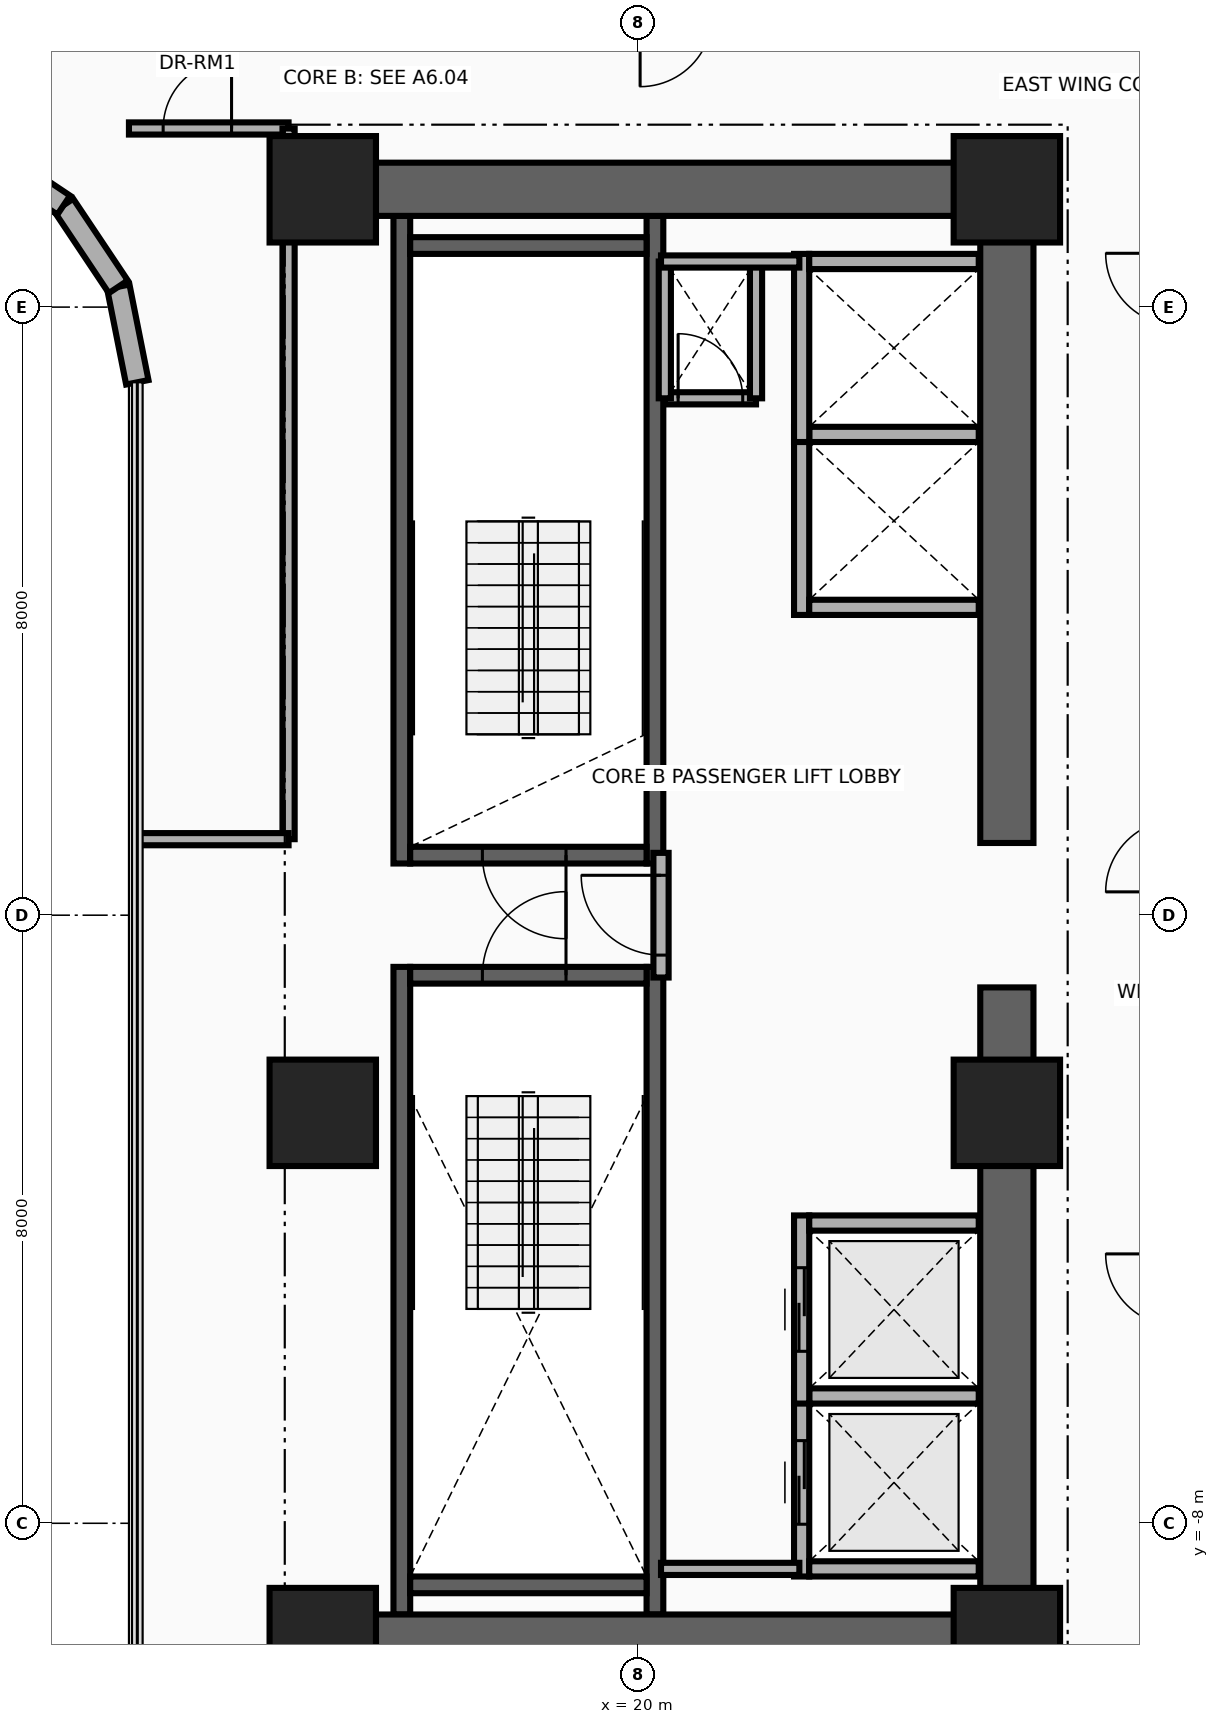
"""IFC4 building model, lengths in metres.
Left out: names, types, materials, properties, quantities, classifications, styles, units other than length and angle.
Written with IfcOpenShell. Run it as: python <this file> out.ifc"""

import sys

from ifc_helpers import new_model, si_unit, direction, frame, frame_2d, origin, origin_2d, place, context, subcontext, project, spatial, rectangle, extrude, source, transform, mapped, element, fill, save


model = new_model("IFC4")
c1 = context("Model", 3, precision=1e-05, world=origin(), true_north=direction((0.0, 1.0)))
c2 = subcontext(c1, "Body", "Model", "MODEL_VIEW")
j1 = project(units=[si_unit("LENGTHUNIT", "METRE"), si_unit("PLANEANGLEUNIT", "RADIAN")], contexts=[c1])
p1 = place(None, origin())
s1 = spatial("IfcSite", under=j1, at=p1, CompositionType="ELEMENT")
p2 = place(p1, origin())
s2 = spatial("IfcBuilding", under=s1, at=p2, CompositionType="ELEMENT")
p3 = place(p2, frame((0.0, 0.0, 29.7)))
s3 = spatial("IfcBuildingStorey", under=s2, at=p3, CompositionType="ELEMENT", Elevation=29.7)
for number, where, z_axis, x_axis in (
    (1, (16.89, 0.68, 0.0), (0.0, 0.0, 1.0), (0.0, 1.0, 0.0)),
    (2, (20.22, 0.68, 0.0), (0.0, 0.0, 1.0), (0.0, 1.0, 0.0)),
):
    element("IfcWall", number, at=place(p3, frame(where, z_axis=z_axis, x_axis=x_axis)), inside=s3, PredefinedType="SHEAR", context=c2, shape_type="SweptSolid", body=[
        extrude(rectangle(XDim=8.52, YDim=0.22, at=frame_2d((4.26, 0.0))), origin(), (0.0, 0.0, 1.0), 3.46),
    ])
p4 = place(p3, frame((17.0, 0.79, 0.0), z_axis=(0.0, 0.0, 1.0), x_axis=(1.0, 0.0, 0.0)))
e3 = element("IfcWall", 3, at=p4, inside=s3, PredefinedType="SHEAR", context=c2, shape_type="SweptSolid", body=[
    extrude(rectangle(XDim=3.11, YDim=0.22, at=frame_2d((1.555, 0.0))), origin(), (0.0, 0.0, 1.0), 3.46),
])
p5 = place(p4, frame((0.95, 0.0, 0.0)))
e4 = element("IfcOpeningElement", 4, at=p5, cuts=e3, PredefinedType="OPENING", context=c2, shape_type="SweptSolid", body=[
    extrude(rectangle(XDim=1.1, YDim=2.15, at=frame_2d((0.55, 1.075))), frame((0.0, 0.125, 0.0), z_axis=(0.0, -1.0, 0.0), x_axis=(1.0, 0.0, 0.0)), (0.0, 0.0, 1.0), 0.25),
])
p6 = place(p3, frame((17.0, 8.81, 0.0), z_axis=(0.0, 0.0, 1.0), x_axis=(1.0, 0.0, 0.0)))
e5 = element("IfcWall", 5, at=p6, inside=s3, PredefinedType="SHEAR", context=c2, shape_type="SweptSolid", body=[
    extrude(rectangle(XDim=3.11, YDim=0.22, at=frame_2d((1.555, 0.0))), origin(), (0.0, 0.0, 1.0), 3.46),
])
for number, where, z_axis, x_axis in (
    (6, (16.89, -9.2, 0.0), (0.0, 0.0, 1.0), (0.0, 1.0, 0.0)),
    (7, (20.22, -9.2, 0.0), (0.0, 0.0, 1.0), (0.0, 1.0, 0.0)),
):
    element("IfcWall", number, at=place(p3, frame(where, z_axis=z_axis, x_axis=x_axis)), inside=s3, PredefinedType="SHEAR", context=c2, shape_type="SweptSolid", body=[
        extrude(rectangle(XDim=8.52, YDim=0.22, at=frame_2d((4.26, 0.0))), origin(), (0.0, 0.0, 1.0), 3.46),
    ])
p7 = place(p3, frame((17.0, -8.81, 0.0), z_axis=(0.0, 0.0, 1.0), x_axis=(1.0, 0.0, 0.0)))
e8 = element("IfcWall", 8, at=p7, inside=s3, PredefinedType="SHEAR", context=c2, shape_type="SweptSolid", body=[
    extrude(rectangle(XDim=3.11, YDim=0.22, at=frame_2d((1.555, 0.0))), origin(), (0.0, 0.0, 1.0), 3.46),
])
p8 = place(p3, frame((17.0, -0.79, 0.0), z_axis=(0.0, 0.0, 1.0), x_axis=(1.0, 0.0, 0.0)))
e9 = element("IfcWall", 9, at=p8, inside=s3, PredefinedType="SHEAR", context=c2, shape_type="SweptSolid", body=[
    extrude(rectangle(XDim=3.11, YDim=0.22, at=frame_2d((1.555, 0.0))), origin(), (0.0, 0.0, 1.0), 3.46),
])
p9 = place(p8, frame((0.95, 0.0, 0.0)))
e10 = element("IfcOpeningElement", 10, at=p9, cuts=e9, PredefinedType="OPENING", context=c2, shape_type="SweptSolid", body=[
    extrude(rectangle(XDim=1.1, YDim=2.15, at=frame_2d((0.55, 1.075))), frame((0.0, 0.125, 0.0), z_axis=(0.0, -1.0, 0.0), x_axis=(1.0, 0.0, 0.0)), (0.0, 0.0, 1.0), 0.25),
])
for number, where, z_axis, x_axis in (
    (11, (24.85, -9.9, 0.0), (0.0, 0.0, 1.0), (0.0, 1.0, 0.0)),
    (12, (24.85, 0.95, 0.0), (0.0, 0.0, 1.0), (0.0, 1.0, 0.0)),
):
    element("IfcWall", number, at=place(p3, frame(where, z_axis=z_axis, x_axis=x_axis)), inside=s3, PredefinedType="SHEAR", context=c2, shape_type="SweptSolid", body=[
        extrude(rectangle(XDim=8.95, YDim=0.7, at=frame_2d((4.475, 0.0))), origin(), (0.0, 0.0, 1.0), 3.46),
    ])
for number, where, z_axis, x_axis in (
    (13, (15.85, 9.55, 0.0), (0.0, 0.0, 1.0), (1.0, 0.0, 0.0)),
    (14, (15.85, -9.55, 0.0), (0.0, 0.0, 1.0), (1.0, 0.0, 0.0)),
):
    element("IfcWall", number, at=place(p3, frame(where, z_axis=z_axis, x_axis=x_axis)), inside=s3, PredefinedType="SHEAR", context=c2, shape_type="SweptSolid", body=[
        extrude(rectangle(XDim=9.0, YDim=0.7, at=frame_2d((4.5, 0.0))), origin(), (0.0, 0.0, 1.0), 3.46),
    ])
m1 = source(origin(), c2, "Body", "SweptSolid", [
    extrude(rectangle(XDim=1.4, YDim=1.4, at=origin_2d()), origin(), (0.0, 0.0, 1.0), 3.7),
])
for number, where, z_axis, x_axis in (
    (15, (15.85, -9.55, 0.0), (0.0, 0.0, 1.0), (1.0, 0.0, 0.0)),
    (16, (24.85, -9.55, 0.0), (0.0, 0.0, 1.0), (1.0, 0.0, 0.0)),
    (17, (15.85, -2.6, 0.0), (0.0, 0.0, 1.0), (1.0, 0.0, 0.0)),
    (18, (24.85, -2.6, 0.0), (0.0, 0.0, 1.0), (1.0, 0.0, 0.0)),
    (19, (15.85, 9.55, 0.0), (0.0, 0.0, 1.0), (1.0, 0.0, 0.0)),
    (20, (24.85, 9.55, 0.0), (0.0, 0.0, 1.0), (1.0, 0.0, 0.0)),
):
    element("IfcColumn", number, at=place(p3, frame(where, z_axis=z_axis, x_axis=x_axis)), inside=s3, PredefinedType="COLUMN", context=c2, shape_type="MappedRepresentation", body=[
        mapped(m1, transform((0.0, 0.0, 0.0), x_axis=(1.0, 0.0, 0.0), y_axis=(0.0, 1.0, 0.0), z_axis=(0.0, 0.0, 1.0), scale=1.0)),
    ])
p10 = place(p3, frame((13.41, 7.011, 0.0), z_axis=(0.0, 0.0, 1.0), x_axis=(-0.195090163074, 0.980785312019, 0.0)))
e21 = element("IfcWall", 21, at=p10, inside=s3, PredefinedType="SOLIDWALL", context=c2, shape_type="SweptSolid", body=[
    extrude(rectangle(XDim=1.281, YDim=0.3, at=frame_2d((0.641, 0.0))), origin(), (0.0, 0.0, 1.0), 3.46),
])
for number, where, z_axis, x_axis in (
    (22, (13.16, 8.268, 0.0), (0.0, 0.0, 1.0), (-0.556, 0.831, 0.0)),
    (23, (12.442, 9.342, 0.0), (0.0, 0.0, 1.0), (-0.831, 0.556, 0.0)),
):
    element("IfcWall", number, at=place(p3, frame(where, z_axis=z_axis, x_axis=x_axis)), inside=s3, PredefinedType="SOLIDWALL", context=c2, shape_type="SweptSolid", body=[
        extrude(rectangle(XDim=1.292, YDim=0.3, at=frame_2d((0.646, 0.0))), origin(), (0.0, 0.0, 1.0), 3.46),
    ])
p11 = place(p3, frame((22.15, -8.7, 0.0), z_axis=(0.0, 0.0, 1.0), x_axis=(0.0, 1.0, 0.0)))
e24 = element("IfcWall", 24, at=p11, inside=s3, PredefinedType="MOVABLE", context=c2, shape_type="SweptSolid", body=[
    extrude(rectangle(XDim=2.475, YDim=0.2, at=frame_2d((1.237, 0.0))), origin(), (0.0, 0.0, 1.0), 3.46),
])
p12 = place(p11, frame((0.688, 0.0, 0.0)))
e25 = element("IfcOpeningElement", 25, at=p12, cuts=e24, PredefinedType="OPENING", context=c2, shape_type="SweptSolid", body=[
    extrude(rectangle(XDim=1.1, YDim=2.1, at=frame_2d((0.55, 1.05))), frame((0.0, 0.115, 0.0), z_axis=(0.0, -1.0, 0.0), x_axis=(1.0, 0.0, 0.0)), (0.0, 0.0, 1.0), 0.23),
])
for number, where, z_axis, x_axis in (
    (26, (22.25, -8.6, 0.0), (0.0, 0.0, 1.0), (1.0, 0.0, 0.0)),
    (27, (22.25, -6.325, 0.0), (0.0, 0.0, 1.0), (1.0, 0.0, 0.0)),
):
    element("IfcWall", number, at=place(p3, frame(where, z_axis=z_axis, x_axis=x_axis)), inside=s3, PredefinedType="MOVABLE", context=c2, shape_type="SweptSolid", body=[
        extrude(rectangle(XDim=2.23, YDim=0.2, at=frame_2d((1.115, 0.0))), origin(), (0.0, 0.0, 1.0), 3.46),
    ])
p13 = place(p3, frame((22.15, -6.425, 0.0), z_axis=(0.0, 0.0, 1.0), x_axis=(0.0, 1.0, 0.0)))
e28 = element("IfcWall", 28, at=p13, inside=s3, PredefinedType="MOVABLE", context=c2, shape_type="SweptSolid", body=[
    extrude(rectangle(XDim=2.475, YDim=0.2, at=frame_2d((1.238, 0.0))), origin(), (0.0, 0.0, 1.0), 3.46),
])
p14 = place(p13, frame((0.688, 0.0, 0.0)))
e29 = element("IfcOpeningElement", 29, at=p14, cuts=e28, PredefinedType="OPENING", context=c2, shape_type="SweptSolid", body=[
    extrude(rectangle(XDim=1.1, YDim=2.1, at=frame_2d((0.55, 1.05))), frame((0.0, 0.115, 0.0), z_axis=(0.0, -1.0, 0.0), x_axis=(1.0, 0.0, 0.0)), (0.0, 0.0, 1.0), 0.23),
])
p15 = place(p3, frame((22.25, -4.05, 0.0), z_axis=(0.0, 0.0, 1.0), x_axis=(1.0, 0.0, 0.0)))
e30 = element("IfcWall", 30, at=p15, inside=s3, PredefinedType="MOVABLE", context=c2, shape_type="SweptSolid", body=[
    extrude(rectangle(XDim=2.23, YDim=0.2, at=frame_2d((1.115, 0.0))), origin(), (0.0, 0.0, 1.0), 3.46),
])
p16 = place(p3, frame((22.15, 3.95, 0.0), z_axis=(0.0, 0.0, 1.0), x_axis=(0.0, 1.0, 0.0)))
e31 = element("IfcWall", 31, at=p16, inside=s3, PredefinedType="MOVABLE", context=c2, shape_type="SweptSolid", body=[
    extrude(rectangle(XDim=2.475, YDim=0.2, at=frame_2d((1.238, 0.0))), origin(), (0.0, 0.0, 1.0), 3.46),
])
for number, where, z_axis, x_axis in (
    (32, (22.25, 4.05, 0.0), (0.0, 0.0, 1.0), (1.0, 0.0, 0.0)),
    (33, (22.25, 6.325, 0.0), (0.0, 0.0, 1.0), (1.0, 0.0, 0.0)),
):
    element("IfcWall", number, at=place(p3, frame(where, z_axis=z_axis, x_axis=x_axis)), inside=s3, PredefinedType="MOVABLE", context=c2, shape_type="SweptSolid", body=[
        extrude(rectangle(XDim=2.23, YDim=0.2, at=frame_2d((1.115, 0.0))), origin(), (0.0, 0.0, 1.0), 2.245),
    ])
p17 = place(p3, frame((22.15, 6.225, 0.0), z_axis=(0.0, 0.0, 1.0), x_axis=(0.0, 1.0, 0.0)))
e34 = element("IfcWall", 34, at=p17, inside=s3, PredefinedType="MOVABLE", context=c2, shape_type="SweptSolid", body=[
    extrude(rectangle(XDim=2.475, YDim=0.2, at=frame_2d((1.237, 0.0))), origin(), (0.0, 0.0, 1.0), 3.46),
])
p18 = place(p3, frame((22.25, 8.6, 0.0), z_axis=(0.0, 0.0, 1.0), x_axis=(1.0, 0.0, 0.0)))
e35 = element("IfcWall", 35, at=p18, inside=s3, PredefinedType="MOVABLE", context=c2, shape_type="SweptSolid", body=[
    extrude(rectangle(XDim=2.23, YDim=0.2, at=frame_2d((1.115, 0.0))), origin(), (0.0, 0.0, 1.0), 2.245),
])
p19 = place(p3, frame((20.3, -0.82, 0.0), z_axis=(0.0, 0.0, 1.0), x_axis=(0.0, 1.0, 0.0)))
e36 = element("IfcWall", 36, at=p19, inside=s3, PredefinedType="PARTITIONING", context=c2, shape_type="SweptSolid", body=[
    extrude(rectangle(XDim=1.64, YDim=0.2, at=frame_2d((0.82, 0.0))), origin(), (0.0, 0.0, 1.0), 3.46),
])
p20 = place(p19, frame((0.295, 0.0, 0.0)))
e37 = element("IfcOpeningElement", 37, at=p20, cuts=e36, PredefinedType="OPENING", context=c2, shape_type="SweptSolid", body=[
    extrude(rectangle(XDim=1.05, YDim=2.15, at=frame_2d((0.525, 1.075))), frame((0.0, 0.115, 0.0), z_axis=(0.0, -1.0, 0.0), x_axis=(1.0, 0.0, 0.0)), (0.0, 0.0, 1.0), 0.23),
])
p21 = place(p3, frame((20.35, 6.8, 0.0), z_axis=(0.0, 0.0, 1.0), x_axis=(1.0, 0.0, 0.0)))
e38 = element("IfcWall", 38, at=p21, inside=s3, PredefinedType="PARTITIONING", context=c2, shape_type="SweptSolid", body=[
    extrude(rectangle(XDim=1.2, YDim=0.16, at=frame_2d((0.6, 0.0))), origin(), (0.0, 0.0, 1.0), 3.46),
])
p22 = place(p21, frame((0.175, 0.0, 0.0)))
e39 = element("IfcOpeningElement", 39, at=p22, cuts=e38, PredefinedType="OPENING", context=c2, shape_type="SweptSolid", body=[
    extrude(rectangle(XDim=0.85, YDim=2.05, at=frame_2d((0.425, 1.025))), frame((0.0, 0.095, 0.0), z_axis=(0.0, -1.0, 0.0), x_axis=(1.0, 0.0, 0.0)), (0.0, 0.0, 1.0), 0.19),
])
for number, where, z_axis, x_axis in (
    (40, (21.55, 6.8, 0.0), (0.0, 0.0, 1.0), (0.0, 1.0, 0.0)),
    (41, (20.35, 6.8, 0.0), (0.0, 0.0, 1.0), (0.0, 1.0, 0.0)),
):
    element("IfcWall", number, at=place(p3, frame(where, z_axis=z_axis, x_axis=x_axis)), inside=s3, PredefinedType="PARTITIONING", context=c2, shape_type="SweptSolid", body=[
        extrude(rectangle(XDim=1.8, YDim=0.16, at=frame_2d((0.9, 0.0))), origin(), (0.0, 0.0, 1.0), 3.46),
    ])
for number, where, z_axis, x_axis in (
    (42, (20.3, -8.6, 0.0), (0.0, 0.0, 1.0), (1.0, 0.0, 0.0)),
    (43, (20.3, 8.6, 0.0), (0.0, 0.0, 1.0), (1.0, 0.0, 0.0)),
):
    element("IfcWall", number, at=place(p3, frame(where, z_axis=z_axis, x_axis=x_axis)), inside=s3, PredefinedType="PARTITIONING", context=c2, shape_type="SweptSolid", body=[
        extrude(rectangle(XDim=1.82, YDim=0.16, at=frame_2d((0.91, 0.0))), origin(), (0.0, 0.0, 1.0), 3.46),
    ])
p23 = place(p3, frame((13.3, 10.35, 0.0), z_axis=(0.0, 0.0, 1.0), x_axis=(1.0, 0.0, 0.0)))
e44 = element("IfcWall", 44, at=p23, inside=s3, PredefinedType="PARTITIONING", context=c2, shape_type="SweptSolid", body=[
    extrude(rectangle(XDim=2.1, YDim=0.16, at=frame_2d((1.05, 0.0))), origin(), (0.0, 0.0, 1.0), 2.583),
])
p24 = place(p23, frame((0.45, 0.0, 0.0)))
e45 = element("IfcOpeningElement", 45, at=p24, cuts=e44, PredefinedType="OPENING", context=c2, shape_type="SweptSolid", body=[
    extrude(rectangle(XDim=0.9, YDim=2.1, at=frame_2d((0.45, 1.05))), frame((0.0, 0.095, 0.0), z_axis=(0.0, -1.0, 0.0), x_axis=(1.0, 0.0, 0.0)), (0.0, 0.0, 1.0), 0.19),
])
p25 = place(p3, frame((15.4, 1.0, 0.0), z_axis=(0.0, 0.0, 1.0), x_axis=(0.0, 1.0, 0.0)))
e46 = element("IfcWall", 46, at=p25, inside=s3, PredefinedType="PARTITIONING", context=c2, shape_type="SweptSolid", body=[
    extrude(rectangle(XDim=9.35, YDim=0.16, at=frame_2d((4.675, 0.0))), origin(), (0.0, 0.0, 1.0), 2.245),
])
p26 = place(p3, frame((13.41, 1.0, 0.0), z_axis=(0.0, 0.0, 1.0), x_axis=(1.0, 0.0, 0.0)))
e47 = element("IfcWall", 47, at=p26, inside=s3, PredefinedType="PARTITIONING", context=c2, shape_type="SweptSolid", body=[
    extrude(rectangle(XDim=1.99, YDim=0.16, at=frame_2d((0.995, 0.0))), origin(), (0.0, 0.0, 1.0), 2.245),
])
p27 = place(p12, origin())
e48 = element("IfcDoor", 48, at=p27, inside=s3, OperationType="DOUBLE_DOOR_SLIDING", PredefinedType="DOOR", context=c2, shape_type="SweptSolid", body=[
    extrude(rectangle(XDim=1.1, YDim=2.1, at=frame_2d((0.55, 1.05))), frame((0.0, 0.025, 0.0), z_axis=(0.0, -1.0, 0.0), x_axis=(1.0, 0.0, 0.0)), (0.0, 0.0, 1.0), 0.05),
])
fill(e25, e48)
p28 = place(p14, origin())
e49 = element("IfcDoor", 49, at=p28, inside=s3, OperationType="DOUBLE_DOOR_SLIDING", PredefinedType="DOOR", context=c2, shape_type="SweptSolid", body=[
    extrude(rectangle(XDim=1.1, YDim=2.1, at=frame_2d((0.55, 1.05))), frame((0.0, 0.025, 0.0), z_axis=(0.0, -1.0, 0.0), x_axis=(1.0, 0.0, 0.0)), (0.0, 0.0, 1.0), 0.05),
])
fill(e29, e49)
p29 = place(p20, origin())
e50 = element("IfcDoor", 50, at=p29, inside=s3, OperationType="SINGLE_SWING_RIGHT", PredefinedType="DOOR", context=c2, shape_type="SweptSolid", body=[
    extrude(rectangle(XDim=1.05, YDim=2.15, at=frame_2d((0.525, 1.075))), frame((0.0, 0.025, 0.0), z_axis=(0.0, -1.0, 0.0), x_axis=(1.0, 0.0, 0.0)), (0.0, 0.0, 1.0), 0.05),
])
fill(e37, e50)
p30 = place(p5, frame((1.1, 0.0, 0.0), z_axis=(0.0, 0.0, 1.0), x_axis=(-1.0, 0.0, 0.0)))
e51 = element("IfcDoor", 51, at=p30, inside=s3, OperationType="SINGLE_SWING_LEFT", PredefinedType="DOOR", context=c2, shape_type="SweptSolid", body=[
    extrude(rectangle(XDim=1.1, YDim=2.15, at=frame_2d((0.55, 1.075))), frame((0.0, 0.025, 0.0), z_axis=(0.0, -1.0, 0.0), x_axis=(1.0, 0.0, 0.0)), (0.0, 0.0, 1.0), 0.05),
])
fill(e4, e51)
p31 = place(p9, origin())
e52 = element("IfcDoor", 52, at=p31, inside=s3, OperationType="SINGLE_SWING_RIGHT", PredefinedType="DOOR", context=c2, shape_type="SweptSolid", body=[
    extrude(rectangle(XDim=1.1, YDim=2.15, at=frame_2d((0.55, 1.075))), frame((0.0, 0.025, 0.0), z_axis=(0.0, -1.0, 0.0), x_axis=(1.0, 0.0, 0.0)), (0.0, 0.0, 1.0), 0.05),
])
fill(e10, e52)
p32 = place(p22, origin())
e53 = element("IfcDoor", 53, at=p32, inside=s3, OperationType="SINGLE_SWING_LEFT", PredefinedType="DOOR", context=c2, shape_type="SweptSolid", body=[
    extrude(rectangle(XDim=0.85, YDim=2.05, at=frame_2d((0.425, 1.025))), frame((0.0, 0.025, 0.0), z_axis=(0.0, -1.0, 0.0), x_axis=(1.0, 0.0, 0.0)), (0.0, 0.0, 1.0), 0.05),
])
fill(e39, e53)
p33 = place(p24, origin())
e54 = element("IfcDoor", 54, at=p33, inside=s3, OperationType="SINGLE_SWING_RIGHT", PredefinedType="DOOR", context=c2, shape_type="SweptSolid", body=[
    extrude(rectangle(XDim=0.9, YDim=2.1, at=frame_2d((0.45, 1.05))), frame((0.0, 0.025, 0.0), z_axis=(0.0, -1.0, 0.0), x_axis=(1.0, 0.0, 0.0)), (0.0, 0.0, 1.0), 0.05),
])
fill(e45, e54)
save(model, sys.argv[1])
